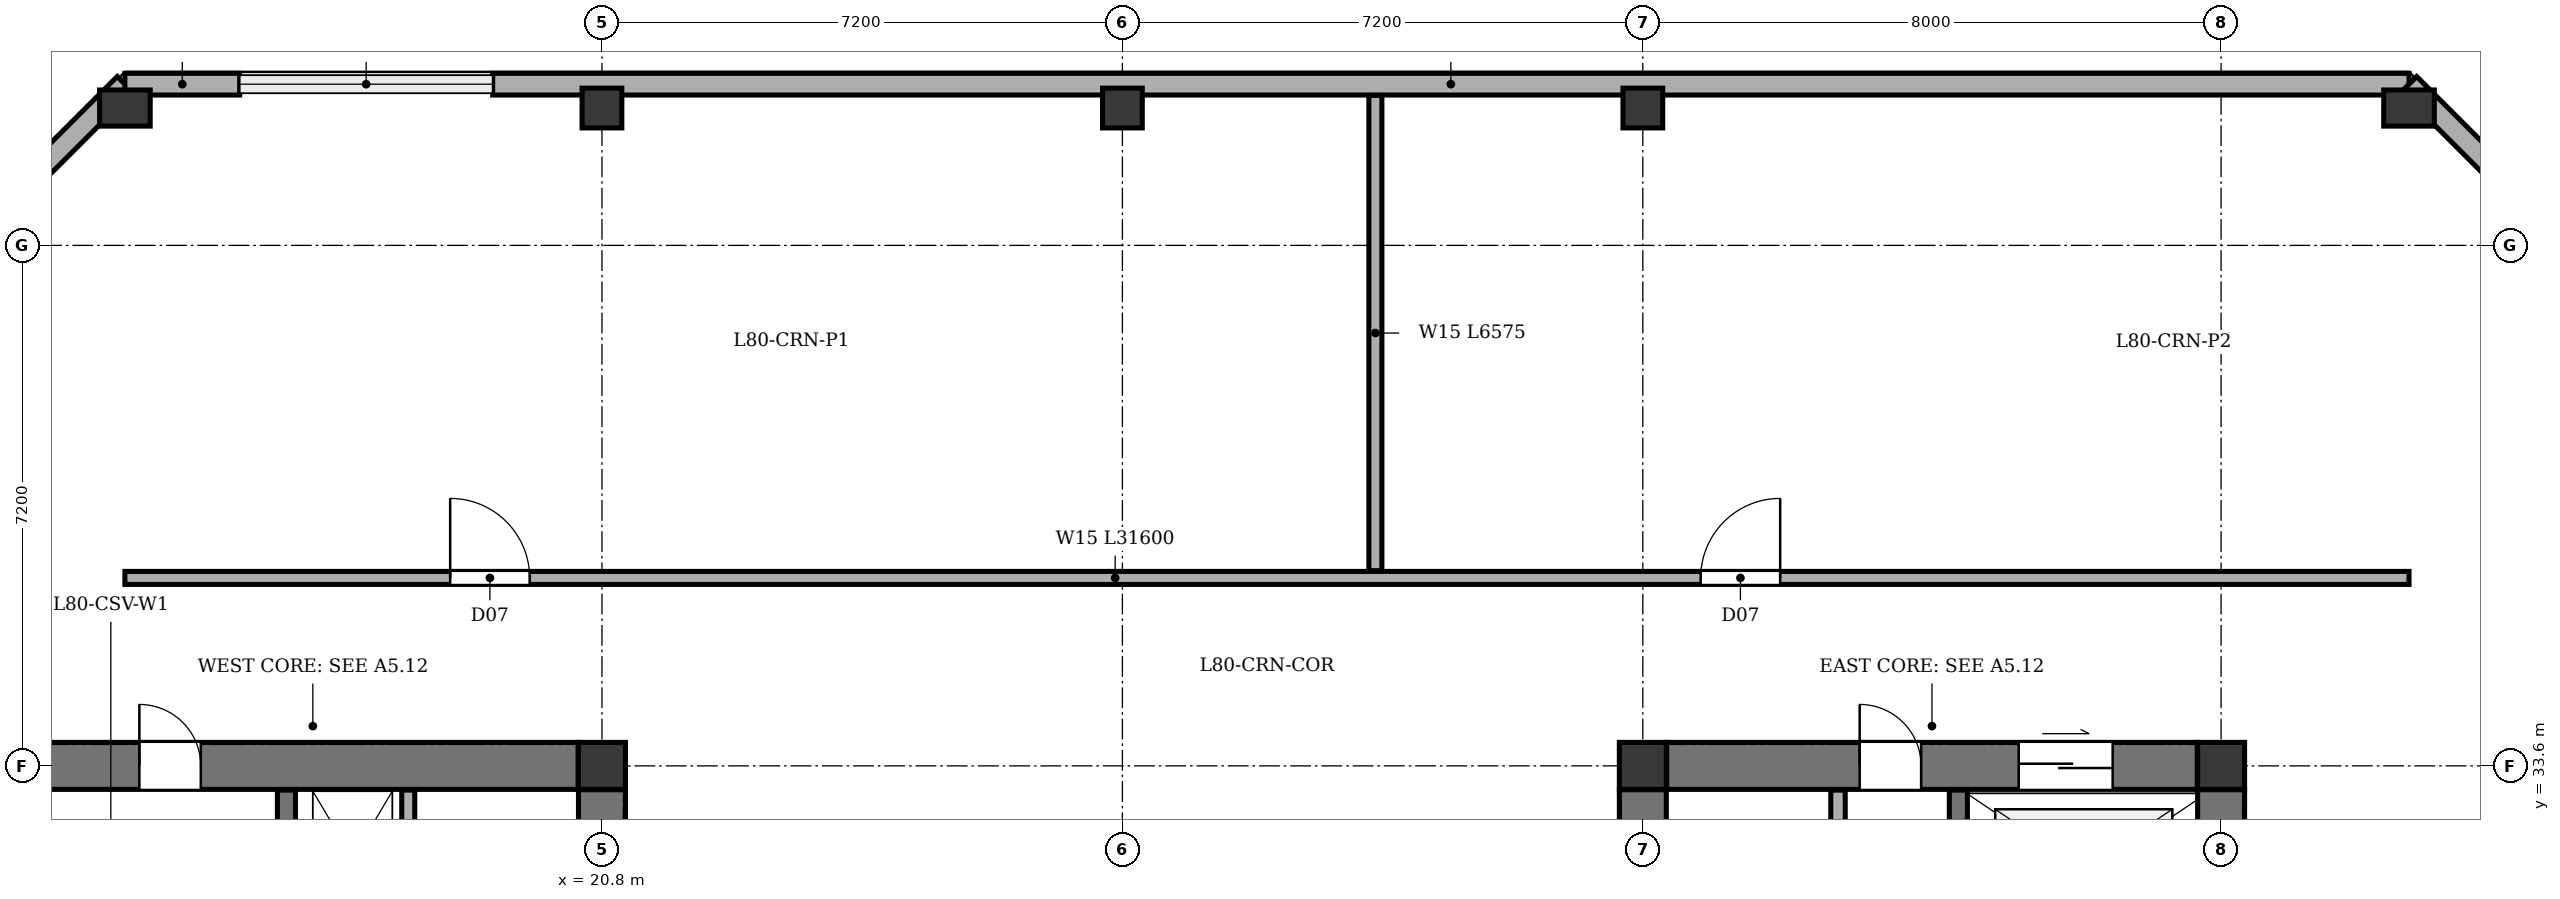
"""IFC4 building model, lengths in metres.
Left out: names, types, materials, properties, quantities, classifications, styles, units other than length and angle.
Written with IfcOpenShell. Run it as: python <this file> out.ifc"""

import sys

from ifc_helpers import new_model, si_unit, direction, frame, frame_2d, origin, origin_2d, place, context, subcontext, project, spatial, rectangle, extrude, element, fill, save


model = new_model("IFC4")
c1 = context("Model", 3, precision=1e-05, world=origin(), true_north=direction((0.0, 1.0)))
c2 = subcontext(c1, "Body", "Model", "MODEL_VIEW")
j1 = project(units=[si_unit("LENGTHUNIT", "METRE"), si_unit("PLANEANGLEUNIT", "RADIAN")], contexts=[c1])
p1 = place(None, origin())
s1 = spatial("IfcSite", under=j1, at=p1, CompositionType="ELEMENT")
p2 = place(p1, origin())
s2 = spatial("IfcBuilding", under=s1, at=p2, CompositionType="ELEMENT")
p3 = place(p2, frame((0.0, 0.0, 304.8)))
s3 = spatial("IfcBuildingStorey", under=s2, at=p3, CompositionType="ELEMENT", Elevation=304.8)
for number, where, z_axis, x_axis in (
    (1, (20.8, 33.6, 0.0), (0.0, 0.0, 1.0), (1.0, 0.0, 0.0)),
    (2, (35.2, 33.6, 0.0), (0.0, 0.0, 1.0), (1.0, 0.0, 0.0)),
    (3, (43.2, 33.6, 0.0), (0.0, 0.0, 1.0), (1.0, 0.0, 0.0)),
):
    element("IfcColumn", number, at=place(p3, frame(where, z_axis=z_axis, x_axis=x_axis)), inside=s3, PredefinedType="COLUMN", context=c2, shape_type="SweptSolid", body=[
        extrude(rectangle(XDim=0.65, YDim=0.65, at=origin_2d()), origin(), (0.0, 0.0, 1.0), 4.2),
    ])
p4 = place(p3, frame((14.2, 42.7, 0.0), z_axis=(0.0, 0.0, 1.0), x_axis=(1.0, 0.0, 0.0)))
e4 = element("IfcColumn", 4, at=p4, inside=s3, PredefinedType="COLUMN", context=c2, shape_type="SweptSolid", body=[
    extrude(rectangle(XDim=0.5, YDim=0.7, at=origin_2d()), origin(), (0.0, 0.0, 1.0), 4.2),
])
for number, where, z_axis, x_axis in (
    (5, (20.8, 42.7, 0.0), (0.0, 0.0, 1.0), (1.0, 0.0, 0.0)),
    (6, (28.0, 42.7, 0.0), (0.0, 0.0, 1.0), (1.0, 0.0, 0.0)),
    (7, (35.2, 42.7, 0.0), (0.0, 0.0, 1.0), (1.0, 0.0, 0.0)),
):
    element("IfcColumn", number, at=place(p3, frame(where, z_axis=z_axis, x_axis=x_axis)), inside=s3, PredefinedType="COLUMN", context=c2, shape_type="SweptSolid", body=[
        extrude(rectangle(XDim=0.55, YDim=0.55, at=origin_2d()), origin(), (0.0, 0.0, 1.0), 4.2),
    ])
p5 = place(p3, frame((45.8, 42.7, 0.0), z_axis=(0.0, 0.0, 1.0), x_axis=(1.0, 0.0, 0.0)))
e8 = element("IfcColumn", 8, at=p5, inside=s3, PredefinedType="COLUMN", context=c2, shape_type="SweptSolid", body=[
    extrude(rectangle(XDim=0.5, YDim=0.7, at=origin_2d()), origin(), (0.0, 0.0, 1.0), 4.2),
])
p6 = place(p3, frame((10.87, 39.7, 0.0), z_axis=(0.0, 0.0, 1.0), x_axis=(0.707080859425, 0.707132701998, 0.0)))
e9 = element("IfcWall", 9, at=p6, inside=s3, PredefinedType="STANDARD", context=c2, shape_type="SweptSolid", body=[
    extrude(rectangle(XDim=4.709, YDim=0.3, at=frame_2d((2.354, 0.0))), origin(), (0.0, 0.0, 1.0), 3.545),
])
p7 = place(p3, frame((14.2, 43.03, 0.0), z_axis=(0.0, 0.0, 1.0), x_axis=(1.0, 0.0, 0.0)))
e10 = element("IfcWall", 10, at=p7, inside=s3, PredefinedType="STANDARD", context=c2, shape_type="SweptSolid", body=[
    extrude(rectangle(XDim=1.588, YDim=0.3, at=frame_2d((0.794, 0.0))), origin(), (0.0, 0.0, 1.0), 3.545),
])
p8 = place(p3, frame((19.288, 43.03, 0.0), z_axis=(0.0, 0.0, 1.0), x_axis=(1.0, 0.0, 0.0)))
e11 = element("IfcWall", 11, at=p8, inside=s3, PredefinedType="STANDARD", context=c2, shape_type="SweptSolid", body=[
    extrude(rectangle(XDim=26.512, YDim=0.3, at=frame_2d((13.256, 0.0))), origin(), (0.0, 0.0, 1.0), 3.545),
])
p9 = place(p3, frame((45.8, 43.03, 0.0), z_axis=(0.0, 0.0, 1.0), x_axis=(0.707080859425, -0.707132701998, 0.0)))
e12 = element("IfcWall", 12, at=p9, inside=s3, PredefinedType="STANDARD", context=c2, shape_type="SweptSolid", body=[
    extrude(rectangle(XDim=4.709, YDim=0.3, at=frame_2d((2.354, 0.0))), origin(), (0.0, 0.0, 1.0), 3.545),
])
p10 = place(p3, frame((13.13, 33.6, 0.0), z_axis=(0.0, 0.0, 1.0), x_axis=(1.0, 0.0, 0.0)))
e13 = element("IfcWall", 13, at=p10, inside=s3, PredefinedType="SHEAR", context=c2, shape_type="SweptSolid", body=[
    extrude(rectangle(XDim=7.34, YDim=0.65, at=frame_2d((3.67, 0.0))), origin(), (0.0, 0.0, 1.0), 3.92),
])
p11 = place(p10, frame((1.27, 0.0, 0.0)))
e14 = element("IfcOpeningElement", 14, at=p11, cuts=e13, PredefinedType="OPENING", context=c2, shape_type="SweptSolid", body=[
    extrude(rectangle(XDim=0.85, YDim=2.02, at=frame_2d((0.425, 1.01))), frame((0.0, 0.335, 0.0), z_axis=(0.0, -1.0, 0.0), x_axis=(1.0, 0.0, 0.0)), (0.0, 0.0, 1.0), 0.67),
])
p12 = place(p3, frame((20.8, 31.1, 0.0), z_axis=(0.0, 0.0, 1.0), x_axis=(0.0, 1.0, 0.0)))
e15 = element("IfcWall", 15, at=p12, inside=s3, PredefinedType="SHEAR", context=c2, shape_type="SweptSolid", body=[
    extrude(rectangle(XDim=2.17, YDim=0.65, at=frame_2d((1.085, 0.0))), origin(), (0.0, 0.0, 1.0), 3.92),
])
p13 = place(p3, frame((16.435, 21.135, 0.0), z_axis=(0.0, 0.0, 1.0), x_axis=(0.0, 1.0, 0.0)))
e16 = element("IfcWall", 16, at=p13, inside=s3, PredefinedType="SHEAR", context=c2, shape_type="SweptSolid", body=[
    extrude(rectangle(XDim=12.13, YDim=0.25, at=frame_2d((6.065, 0.0))), origin(), (0.0, 0.0, 1.0), 3.92),
])
p14 = place(p13, frame((0.515, 0.0, 0.0)))
e17 = element("IfcOpeningElement", 17, at=p14, cuts=e16, PredefinedType="OPENING", context=c2, shape_type="SweptSolid", body=[
    extrude(rectangle(XDim=1.2, YDim=2.15, at=frame_2d((0.6, 1.075))), frame((0.0, 0.135, 0.0), z_axis=(0.0, -1.0, 0.0), x_axis=(1.0, 0.0, 0.0)), (0.0, 0.0, 1.0), 0.27),
])
p15 = place(p13, frame((2.665, 0.0, 0.0)))
e18 = element("IfcOpeningElement", 18, at=p15, cuts=e16, PredefinedType="OPENING", context=c2, shape_type="SweptSolid", body=[
    extrude(rectangle(XDim=1.15, YDim=2.15, at=frame_2d((0.575, 1.075))), frame((0.0, 0.135, 0.0), z_axis=(0.0, -1.0, 0.0), x_axis=(1.0, 0.0, 0.0)), (0.0, 0.0, 1.0), 0.27),
])
p16 = place(p3, frame((18.12, 31.17, 0.0), z_axis=(0.0, 0.0, 1.0), x_axis=(0.0, 1.0, 0.0)))
e19 = element("IfcWall", 19, at=p16, inside=s3, PredefinedType="PARTITIONING", context=c2, shape_type="SweptSolid", body=[
    extrude(rectangle(XDim=2.095, YDim=0.18, at=frame_2d((1.047, 0.0))), origin(), (0.0, 0.0, 1.0), 3.92),
])
p17 = place(p3, frame((43.2, 21.13, 0.0), z_axis=(0.0, 0.0, 1.0), x_axis=(0.0, 1.0, 0.0)))
e20 = element("IfcWall", 20, at=p17, inside=s3, PredefinedType="SHEAR", context=c2, shape_type="SweptSolid", body=[
    extrude(rectangle(XDim=12.14, YDim=0.65, at=frame_2d((6.07, 0.0))), origin(), (0.0, 0.0, 1.0), 3.92),
])
p18 = place(p3, frame((35.53, 33.6, 0.0), z_axis=(0.0, 0.0, 1.0), x_axis=(1.0, 0.0, 0.0)))
e21 = element("IfcWall", 21, at=p18, inside=s3, PredefinedType="SHEAR", context=c2, shape_type="SweptSolid", body=[
    extrude(rectangle(XDim=7.34, YDim=0.65, at=frame_2d((3.67, 0.0))), origin(), (0.0, 0.0, 1.0), 3.92),
])
p19 = place(p18, frame((4.87, 0.0, 0.0)))
e22 = element("IfcOpeningElement", 22, at=p19, cuts=e21, PredefinedType="OPENING", context=c2, shape_type="SweptSolid", body=[
    extrude(rectangle(XDim=1.3, YDim=2.15, at=frame_2d((0.65, 1.075))), frame((0.0, 0.335, 0.0), z_axis=(0.0, -1.0, 0.0), x_axis=(1.0, 0.0, 0.0)), (0.0, 0.0, 1.0), 0.67),
])
p20 = place(p18, frame((2.67, 0.0, 0.0)))
e23 = element("IfcOpeningElement", 23, at=p20, cuts=e21, PredefinedType="OPENING", context=c2, shape_type="SweptSolid", body=[
    extrude(rectangle(XDim=0.85, YDim=2.02, at=frame_2d((0.425, 1.01))), frame((0.0, 0.335, 0.0), z_axis=(0.0, -1.0, 0.0), x_axis=(1.0, 0.0, 0.0)), (0.0, 0.0, 1.0), 0.67),
])
p21 = place(p3, frame((35.2, 31.1, 0.0), z_axis=(0.0, 0.0, 1.0), x_axis=(0.0, 1.0, 0.0)))
e24 = element("IfcWall", 24, at=p21, inside=s3, PredefinedType="SHEAR", context=c2, shape_type="SweptSolid", body=[
    extrude(rectangle(XDim=2.17, YDim=0.65, at=frame_2d((1.085, 0.0))), origin(), (0.0, 0.0, 1.0), 3.92),
])
p22 = place(p3, frame((39.565, 21.135, 0.0), z_axis=(0.0, 0.0, 1.0), x_axis=(0.0, 1.0, 0.0)))
e25 = element("IfcWall", 25, at=p22, inside=s3, PredefinedType="SHEAR", context=c2, shape_type="SweptSolid", body=[
    extrude(rectangle(XDim=12.13, YDim=0.25, at=frame_2d((6.065, 0.0))), origin(), (0.0, 0.0, 1.0), 3.92),
])
p23 = place(p22, frame((0.515, 0.0, 0.0)))
e26 = element("IfcOpeningElement", 26, at=p23, cuts=e25, PredefinedType="OPENING", context=c2, shape_type="SweptSolid", body=[
    extrude(rectangle(XDim=1.2, YDim=2.15, at=frame_2d((0.6, 1.075))), frame((0.0, 0.135, 0.0), z_axis=(0.0, -1.0, 0.0), x_axis=(1.0, 0.0, 0.0)), (0.0, 0.0, 1.0), 0.27),
])
p24 = place(p22, frame((2.665, 0.0, 0.0)))
e27 = element("IfcOpeningElement", 27, at=p24, cuts=e25, PredefinedType="OPENING", context=c2, shape_type="SweptSolid", body=[
    extrude(rectangle(XDim=1.15, YDim=2.15, at=frame_2d((0.575, 1.075))), frame((0.0, 0.135, 0.0), z_axis=(0.0, -1.0, 0.0), x_axis=(1.0, 0.0, 0.0)), (0.0, 0.0, 1.0), 0.27),
])
p25 = place(p3, frame((37.9, 25.27, 0.0), z_axis=(0.0, 0.0, 1.0), x_axis=(0.0, 1.0, 0.0)))
e28 = element("IfcWall", 28, at=p25, inside=s3, PredefinedType="SOLIDWALL", context=c2, shape_type="SweptSolid", body=[
    extrude(rectangle(XDim=7.995, YDim=0.2, at=frame_2d((3.998, 0.0))), origin(), (0.0, 0.0, 1.0), 3.92),
])
p26 = place(p3, frame((14.2, 36.2, 0.0), z_axis=(0.0, 0.0, 1.0), x_axis=(1.0, 0.0, 0.0)))
e29 = element("IfcWall", 29, at=p26, inside=s3, PredefinedType="PARTITIONING", context=c2, shape_type="SweptSolid", body=[
    extrude(rectangle(XDim=31.6, YDim=0.18, at=frame_2d((15.8, 0.0))), origin(), (0.0, 0.0, 1.0), 3.92),
])
p27 = place(p26, frame((4.5, 0.0, 0.0)))
e30 = element("IfcOpeningElement", 30, at=p27, cuts=e29, PredefinedType="OPENING", context=c2, shape_type="SweptSolid", body=[
    extrude(rectangle(XDim=1.1, YDim=2.15, at=frame_2d((0.55, 1.075))), frame((0.0, 0.1, 0.0), z_axis=(0.0, -1.0, 0.0), x_axis=(1.0, 0.0, 0.0)), (0.0, 0.0, 1.0), 0.2),
])
p28 = place(p26, frame((21.8, 0.0, 0.0)))
e31 = element("IfcOpeningElement", 31, at=p28, cuts=e29, PredefinedType="OPENING", context=c2, shape_type="SweptSolid", body=[
    extrude(rectangle(XDim=1.1, YDim=2.15, at=frame_2d((0.55, 1.075))), frame((0.0, 0.1, 0.0), z_axis=(0.0, -1.0, 0.0), x_axis=(1.0, 0.0, 0.0)), (0.0, 0.0, 1.0), 0.2),
])
p29 = place(p3, frame((31.5, 36.3, 0.0), z_axis=(0.0, 0.0, 1.0), x_axis=(0.0, 1.0, 0.0)))
e32 = element("IfcWall", 32, at=p29, inside=s3, PredefinedType="PARTITIONING", context=c2, shape_type="SweptSolid", body=[
    extrude(rectangle(XDim=6.575, YDim=0.18, at=frame_2d((3.288, 0.0))), origin(), (0.0, 0.0, 1.0), 3.92),
])
p30 = place(p11, origin())
e33 = element("IfcDoor", 33, at=p30, inside=s3, OperationType="SINGLE_SWING_LEFT", PredefinedType="DOOR", context=c2, shape_type="SweptSolid", body=[
    extrude(rectangle(XDim=0.85, YDim=2.02, at=frame_2d((0.425, 1.01))), frame((0.0, 0.025, 0.0), z_axis=(0.0, -1.0, 0.0), x_axis=(1.0, 0.0, 0.0)), (0.0, 0.0, 1.0), 0.05),
])
fill(e14, e33)
p31 = place(p19, origin())
e34 = element("IfcDoor", 34, at=p31, inside=s3, OperationType="DOUBLE_DOOR_SLIDING", PredefinedType="DOOR", context=c2, shape_type="SweptSolid", body=[
    extrude(rectangle(XDim=1.3, YDim=2.15, at=frame_2d((0.65, 1.075))), frame((0.0, 0.025, 0.0), z_axis=(0.0, -1.0, 0.0), x_axis=(1.0, 0.0, 0.0)), (0.0, 0.0, 1.0), 0.05),
])
fill(e22, e34)
p32 = place(p20, origin())
e35 = element("IfcDoor", 35, at=p32, inside=s3, OperationType="SINGLE_SWING_LEFT", PredefinedType="DOOR", context=c2, shape_type="SweptSolid", body=[
    extrude(rectangle(XDim=0.85, YDim=2.02, at=frame_2d((0.425, 1.01))), frame((0.0, 0.025, 0.0), z_axis=(0.0, -1.0, 0.0), x_axis=(1.0, 0.0, 0.0)), (0.0, 0.0, 1.0), 0.05),
])
fill(e23, e35)
p33 = place(p27, origin())
e36 = element("IfcDoor", 36, at=p33, inside=s3, OperationType="SINGLE_SWING_LEFT", PredefinedType="DOOR", context=c2, shape_type="SweptSolid", body=[
    extrude(rectangle(XDim=1.1, YDim=2.15, at=frame_2d((0.55, 1.075))), frame((0.0, 0.025, 0.0), z_axis=(0.0, -1.0, 0.0), x_axis=(1.0, 0.0, 0.0)), (0.0, 0.0, 1.0), 0.05),
])
fill(e30, e36)
p34 = place(p28, origin())
e37 = element("IfcDoor", 37, at=p34, inside=s3, OperationType="SINGLE_SWING_RIGHT", PredefinedType="DOOR", context=c2, shape_type="SweptSolid", body=[
    extrude(rectangle(XDim=1.1, YDim=2.15, at=frame_2d((0.55, 1.075))), frame((0.0, 0.025, 0.0), z_axis=(0.0, -1.0, 0.0), x_axis=(1.0, 0.0, 0.0)), (0.0, 0.0, 1.0), 0.05),
])
fill(e31, e37)
save(model, sys.argv[1])
